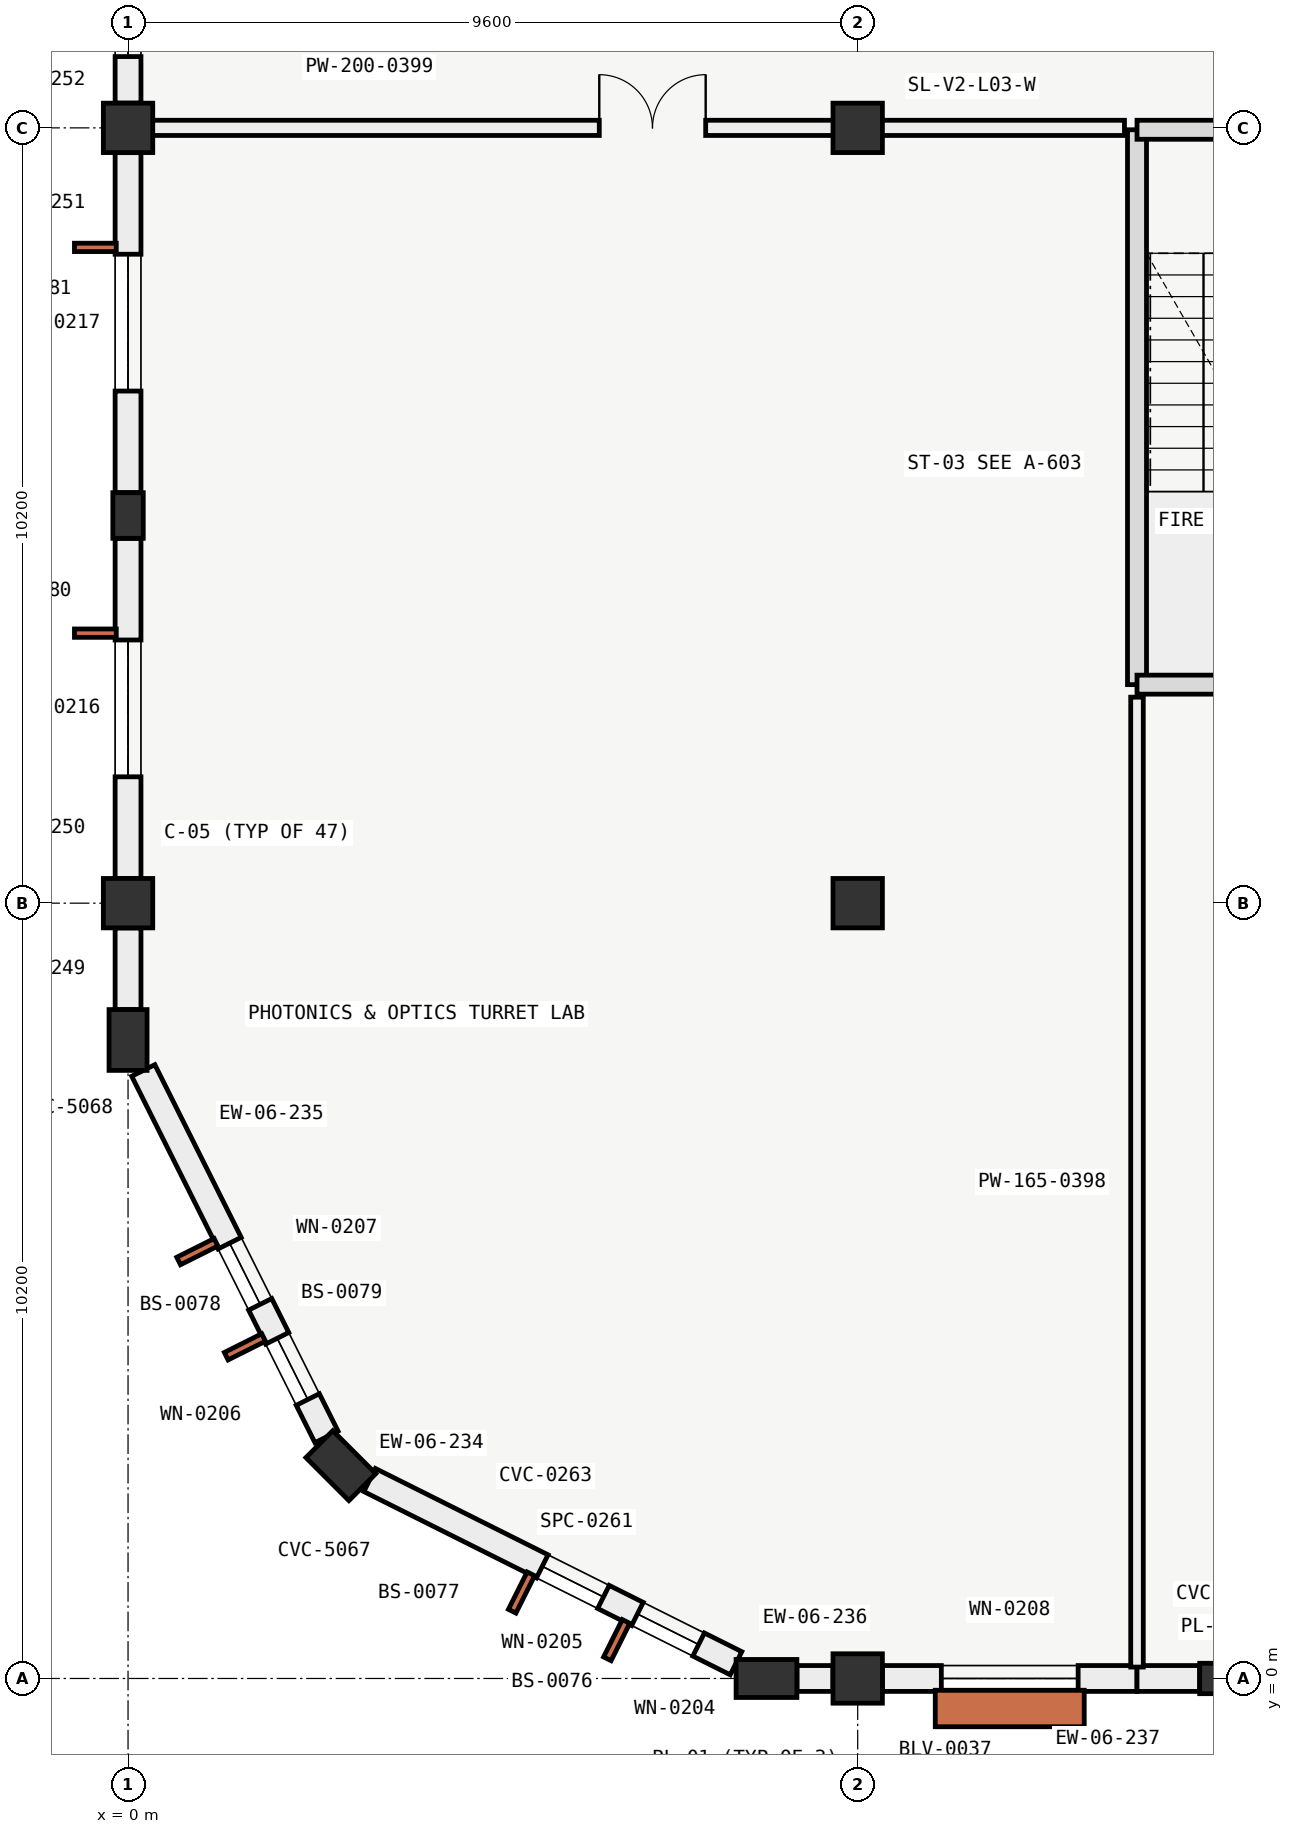
"""IFC4 building model, lengths in metres.
Left out: names, types, materials, properties, quantities, classifications, styles, units other than length and angle.
Written with IfcOpenShell. Run it as: python <this file> out.ifc"""

import sys

from ifc_helpers import new_model, si_unit, direction, frame, frame_2d, origin, origin_2d, place, context, subcontext, project, spatial, rectangle, extrude, element, fill, save


model = new_model("IFC4")
c1 = context("Model", 3, precision=1e-05, world=origin(), true_north=direction((0.0, 1.0)))
c2 = subcontext(c1, "Body", "Model", "MODEL_VIEW")
j1 = project(units=[si_unit("LENGTHUNIT", "METRE"), si_unit("PLANEANGLEUNIT", "RADIAN")], contexts=[c1])
p1 = place(None, origin())
s1 = spatial("IfcSite", under=j1, at=p1, CompositionType="ELEMENT")
p2 = place(p1, origin())
s2 = spatial("IfcBuilding", under=s1, at=p2, CompositionType="ELEMENT")
p3 = place(p2, frame((0.0, 0.0, 13.8)))
s3 = spatial("IfcBuildingStorey", under=s2, at=p3, CompositionType="ELEMENT", Elevation=13.8)
for number, where, z_axis, x_axis in (
    (1, (0.0, 10.2, 0.0), (0.0, 0.0, 1.0), (1.0, 0.0, 0.0)),
    (2, (0.0, 20.4, 0.0), (0.0, 0.0, 1.0), (1.0, 0.0, 0.0)),
    (3, (9.6, 0.0, 0.0), (0.0, 0.0, 1.0), (1.0, 0.0, 0.0)),
    (4, (9.6, 10.2, 0.0), (0.0, 0.0, 1.0), (1.0, 0.0, 0.0)),
    (5, (9.6, 20.4, 0.0), (0.0, 0.0, 1.0), (1.0, 0.0, 0.0)),
):
    element("IfcColumn", number, at=place(p3, frame(where, z_axis=z_axis, x_axis=x_axis)), inside=s3, PredefinedType="COLUMN", context=c2, shape_type="SweptSolid", body=[
        extrude(rectangle(XDim=0.65, YDim=0.65, at=origin_2d()), origin(), (0.0, 0.0, 1.0), 4.2),
    ])
for number, where, z_axis, x_axis in (
    (6, (8.4, 0.0, 0.0), (0.0, 0.0, 1.0), (0.0, 1.0, 0.0)),
    (7, (2.8, 2.8, 0.0), (0.0, 0.0, 1.0), (0.707, 0.707, 0.0)),
    (8, (0.0, 8.4, 0.0), (0.0, 0.0, 1.0), (1.0, 0.0, 0.0)),
):
    element("IfcColumn", number, at=place(p3, frame(where, z_axis=z_axis, x_axis=x_axis)), inside=s3, PredefinedType="PILASTER", context=c2, shape_type="SweptSolid", body=[
        extrude(rectangle(XDim=0.5, YDim=0.8, at=origin_2d()), origin(), (0.0, 0.0, 1.0), 4.2),
    ])
for number, where, z_axis, x_axis in (
    (9, (14.4, 0.0, 0.0), (0.0, 0.0, 1.0), (0.0, 1.0, 0.0)),
    (10, (0.0, 15.3, 0.0), (0.0, 0.0, 1.0), (1.0, 0.0, 0.0)),
):
    element("IfcColumn", number, at=place(p3, frame(where, z_axis=z_axis, x_axis=x_axis)), inside=s3, PredefinedType="PILASTER", context=c2, shape_type="SweptSolid", body=[
        extrude(rectangle(XDim=0.4, YDim=0.6, at=origin_2d()), origin(), (0.0, 0.0, 1.0), 4.2),
    ])
p4 = place(p3, frame((7.999, 0.2, 0.0), z_axis=(0.0, 0.0, 1.0), x_axis=(-0.894418132042, 0.447231712958, 0.0)))
e11 = element("IfcWall", 11, at=p4, inside=s3, PredefinedType="SOLIDWALL", context=c2, shape_type="SweptSolid", body=[
    extrude(rectangle(XDim=5.39, YDim=0.34, at=frame_2d((2.695, 0.0))), origin(), (0.0, 0.0, 1.0), 3.23),
])
p5 = place(p4, frame((0.55, 0.0, 0.7)))
e12 = element("IfcOpeningElement", 12, at=p5, cuts=e11, PredefinedType="OPENING", context=c2, shape_type="SweptSolid", body=[
    extrude(rectangle(XDim=0.9, YDim=2.2, at=frame_2d((0.45, 1.1))), frame((0.0, 0.18, 0.0), z_axis=(0.0, -1.0, 0.0), x_axis=(1.0, 0.0, 0.0)), (0.0, 0.0, 1.0), 0.36),
])
p6 = place(p4, frame((1.95, 0.0, 0.7)))
e13 = element("IfcOpeningElement", 13, at=p6, cuts=e11, PredefinedType="OPENING", context=c2, shape_type="SweptSolid", body=[
    extrude(rectangle(XDim=0.9, YDim=2.2, at=frame_2d((0.45, 1.1))), frame((0.0, 0.18, 0.0), z_axis=(0.0, -1.0, 0.0), x_axis=(1.0, 0.0, 0.0)), (0.0, 0.0, 1.0), 0.36),
])
p7 = place(p3, frame((2.611, 3.178, 0.0), z_axis=(0.0, 0.0, 1.0), x_axis=(-0.447231712958, 0.894418132042, 0.0)))
e14 = element("IfcWall", 14, at=p7, inside=s3, PredefinedType="SOLIDWALL", context=c2, shape_type="SweptSolid", body=[
    extrude(rectangle(XDim=5.39, YDim=0.34, at=frame_2d((2.695, 0.0))), origin(), (0.0, 0.0, 1.0), 3.23),
])
p8 = place(p7, frame((0.55, 0.0, 0.7)))
e15 = element("IfcOpeningElement", 15, at=p8, cuts=e14, PredefinedType="OPENING", context=c2, shape_type="SweptSolid", body=[
    extrude(rectangle(XDim=0.9, YDim=2.2, at=frame_2d((0.45, 1.1))), frame((0.0, 0.18, 0.0), z_axis=(0.0, -1.0, 0.0), x_axis=(1.0, 0.0, 0.0)), (0.0, 0.0, 1.0), 0.36),
])
p9 = place(p7, frame((1.95, 0.0, 0.7)))
e16 = element("IfcOpeningElement", 16, at=p9, cuts=e14, PredefinedType="OPENING", context=c2, shape_type="SweptSolid", body=[
    extrude(rectangle(XDim=0.9, YDim=2.2, at=frame_2d((0.45, 1.1))), frame((0.0, 0.18, 0.0), z_axis=(0.0, -1.0, 0.0), x_axis=(1.0, 0.0, 0.0)), (0.0, 0.0, 1.0), 0.36),
])
p10 = place(p3, frame((9.274, 0.0, 0.0), z_axis=(0.0, 0.0, 1.0), x_axis=(-1.0, 0.0, 0.0)))
e17 = element("IfcWall", 17, at=p10, inside=s3, PredefinedType="SOLIDWALL", context=c2, shape_type="SweptSolid", body=[
    extrude(rectangle(XDim=0.473, YDim=0.34, at=frame_2d((0.236, 0.0))), origin(), (0.0, 0.0, 1.0), 3.28),
])
p11 = place(p3, frame((13.275, 0.0, 0.0), z_axis=(0.0, 0.0, 1.0), x_axis=(-1.0, 0.0, 0.0)))
e18 = element("IfcWall", 18, at=p11, inside=s3, PredefinedType="SOLIDWALL", context=c2, shape_type="SweptSolid", body=[
    extrude(rectangle(XDim=3.349, YDim=0.34, at=frame_2d((1.674, 0.0))), origin(), (0.0, 0.0, 1.0), 3.28),
])
p12 = place(p11, frame((0.774, 0.0, 0.8)))
e19 = element("IfcOpeningElement", 19, at=p12, cuts=e18, PredefinedType="OPENING", context=c2, shape_type="SweptSolid", body=[
    extrude(rectangle(XDim=1.8, YDim=2.1, at=frame_2d((0.9, 1.05))), frame((0.0, 0.18, 0.0), z_axis=(0.0, -1.0, 0.0), x_axis=(1.0, 0.0, 0.0)), (0.0, 0.0, 1.0), 0.36),
])
p13 = place(p3, frame((14.099, 0.0, 0.0), z_axis=(0.0, 0.0, 1.0), x_axis=(-1.0, 0.0, 0.0)))
e20 = element("IfcWall", 20, at=p13, inside=s3, PredefinedType="SOLIDWALL", context=c2, shape_type="SweptSolid", body=[
    extrude(rectangle(XDim=0.824, YDim=0.34, at=frame_2d((0.412, 0.0))), origin(), (0.0, 0.0, 1.0), 3.28),
])
p14 = place(p3, frame((0.0, 8.801, 0.0), z_axis=(0.0, 0.0, 1.0), x_axis=(0.0, 1.0, 0.0)))
e21 = element("IfcWall", 21, at=p14, inside=s3, PredefinedType="SOLIDWALL", context=c2, shape_type="SweptSolid", body=[
    extrude(rectangle(XDim=1.073, YDim=0.34, at=frame_2d((0.537, 0.0))), origin(), (0.0, 0.0, 1.0), 3.28),
])
p15 = place(p3, frame((0.0, 10.526, 0.0), z_axis=(0.0, 0.0, 1.0), x_axis=(0.0, 1.0, 0.0)))
e22 = element("IfcWall", 22, at=p15, inside=s3, PredefinedType="SOLIDWALL", context=c2, shape_type="SweptSolid", body=[
    extrude(rectangle(XDim=4.473, YDim=0.34, at=frame_2d((2.237, 0.0))), origin(), (0.0, 0.0, 1.0), 3.28),
])
p16 = place(p15, frame((1.336, 0.0, 0.85)))
e23 = element("IfcOpeningElement", 23, at=p16, cuts=e22, PredefinedType="OPENING", context=c2, shape_type="SweptSolid", body=[
    extrude(rectangle(XDim=1.8, YDim=2.1, at=frame_2d((0.9, 1.05))), frame((0.0, 0.18, 0.0), z_axis=(0.0, -1.0, 0.0), x_axis=(1.0, 0.0, 0.0)), (0.0, 0.0, 1.0), 0.36),
])
p17 = place(p3, frame((0.0, 15.601, 0.0), z_axis=(0.0, 0.0, 1.0), x_axis=(0.0, 1.0, 0.0)))
e24 = element("IfcWall", 24, at=p17, inside=s3, PredefinedType="SOLIDWALL", context=c2, shape_type="SweptSolid", body=[
    extrude(rectangle(XDim=4.473, YDim=0.34, at=frame_2d((2.236, 0.0))), origin(), (0.0, 0.0, 1.0), 3.28),
])
p18 = place(p17, frame((1.336, 0.0, 0.85)))
e25 = element("IfcOpeningElement", 25, at=p18, cuts=e24, PredefinedType="OPENING", context=c2, shape_type="SweptSolid", body=[
    extrude(rectangle(XDim=1.8, YDim=2.1, at=frame_2d((0.9, 1.05))), frame((0.0, 0.18, 0.0), z_axis=(0.0, -1.0, 0.0), x_axis=(1.0, 0.0, 0.0)), (0.0, 0.0, 1.0), 0.36),
])
p19 = place(p3, frame((0.0, 20.726, 0.0), z_axis=(0.0, 0.0, 1.0), x_axis=(0.0, 1.0, 0.0)))
e26 = element("IfcWall", 26, at=p19, inside=s3, PredefinedType="SOLIDWALL", context=c2, shape_type="SweptSolid", body=[
    extrude(rectangle(XDim=3.224, YDim=0.34, at=frame_2d((1.612, 0.0))), origin(), (0.0, 0.0, 1.0), 3.28),
])
p20 = place(p19, frame((0.612, 0.0, 0.75)))
e27 = element("IfcOpeningElement", 27, at=p20, cuts=e26, PredefinedType="OPENING", context=c2, shape_type="SweptSolid", body=[
    extrude(rectangle(XDim=2.0, YDim=1.35, at=frame_2d((1.0, 0.675))), frame((0.0, 0.18, 0.0), z_axis=(0.0, -1.0, 0.0), x_axis=(1.0, 0.0, 0.0)), (0.0, 0.0, 1.0), 0.36),
])
p21 = place(p3, frame((13.275, 20.375, 0.0), z_axis=(0.0, 0.0, 1.0), x_axis=(0.0, -1.0, 0.0)))
e28 = element("IfcWall", 28, at=p21, inside=s3, PredefinedType="SOLIDWALL", context=c2, shape_type="SweptSolid", body=[
    extrude(rectangle(XDim=7.3, YDim=0.25, at=frame_2d((3.65, 0.0))), origin(), (0.0, 0.0, 1.0), 3.95),
])
p22 = place(p3, frame((13.275, 13.075, 0.0), z_axis=(0.0, 0.0, 1.0), x_axis=(1.0, 0.0, 0.0)))
e29 = element("IfcWall", 29, at=p22, inside=s3, PredefinedType="SOLIDWALL", context=c2, shape_type="SweptSolid", body=[
    extrude(rectangle(XDim=3.45, YDim=0.25, at=frame_2d((1.725, 0.0))), origin(), (0.0, 0.0, 1.0), 3.95),
])
p23 = place(p3, frame((16.725, 20.375, 0.0), z_axis=(0.0, 0.0, 1.0), x_axis=(-1.0, 0.0, 0.0)))
e30 = element("IfcWall", 30, at=p23, inside=s3, PredefinedType="SOLIDWALL", context=c2, shape_type="SweptSolid", body=[
    extrude(rectangle(XDim=3.45, YDim=0.25, at=frame_2d((1.725, 0.0))), origin(), (0.0, 0.0, 1.0), 3.95),
])
p24 = place(p23, frame((1.175, 0.0, 0.0)))
e31 = element("IfcOpeningElement", 31, at=p24, cuts=e30, PredefinedType="OPENING", context=c2, shape_type="SweptSolid", body=[
    extrude(rectangle(XDim=1.1, YDim=2.2, at=frame_2d((0.55, 1.1))), frame((0.0, 0.135, 0.0), z_axis=(0.0, -1.0, 0.0), x_axis=(1.0, 0.0, 0.0)), (0.0, 0.0, 1.0), 0.27),
])
p25 = place(p3, frame((13.275, 0.15, 0.0), z_axis=(0.0, 0.0, 1.0), x_axis=(0.0, 1.0, 0.0)))
e32 = element("IfcWall", 32, at=p25, inside=s3, PredefinedType="PARTITIONING", context=c2, shape_type="SweptSolid", body=[
    extrude(rectangle(XDim=12.76, YDim=0.165, at=frame_2d((6.38, 0.0))), origin(), (0.0, 0.0, 1.0), 3.33),
])
p26 = place(p3, frame((0.15, 20.4, 0.0), z_axis=(0.0, 0.0, 1.0), x_axis=(1.0, 0.0, 0.0)))
e33 = element("IfcWall", 33, at=p26, inside=s3, PredefinedType="PARTITIONING", context=c2, shape_type="SweptSolid", body=[
    extrude(rectangle(XDim=12.96, YDim=0.2, at=frame_2d((6.48, 0.0))), origin(), (0.0, 0.0, 1.0), 3.28),
])
p27 = place(p26, frame((6.05, 0.0, 0.0)))
e34 = element("IfcOpeningElement", 34, at=p27, cuts=e33, PredefinedType="OPENING", context=c2, shape_type="SweptSolid", body=[
    extrude(rectangle(XDim=1.4, YDim=2.2, at=frame_2d((0.7, 1.1))), frame((0.0, 0.11, 0.0), z_axis=(0.0, -1.0, 0.0), x_axis=(1.0, 0.0, 0.0)), (0.0, 0.0, 1.0), 0.22),
])
p28 = place(p5, origin())
e35 = element("IfcWindow", 35, at=p28, inside=s3, PartitioningType="SINGLE_PANEL", PredefinedType="WINDOW", context=c2, shape_type="SweptSolid", body=[
    extrude(rectangle(XDim=0.9, YDim=2.2, at=frame_2d((0.45, 1.1))), frame((0.0, 0.03, 0.0), z_axis=(0.0, -1.0, 0.0), x_axis=(1.0, 0.0, 0.0)), (0.0, 0.0, 1.0), 0.06),
])
fill(e12, e35)
p29 = place(p6, origin())
e36 = element("IfcWindow", 36, at=p29, inside=s3, PartitioningType="SINGLE_PANEL", PredefinedType="WINDOW", context=c2, shape_type="SweptSolid", body=[
    extrude(rectangle(XDim=0.9, YDim=2.2, at=frame_2d((0.45, 1.1))), frame((0.0, 0.03, 0.0), z_axis=(0.0, -1.0, 0.0), x_axis=(1.0, 0.0, 0.0)), (0.0, 0.0, 1.0), 0.06),
])
fill(e13, e36)
p30 = place(p8, origin())
e37 = element("IfcWindow", 37, at=p30, inside=s3, PartitioningType="SINGLE_PANEL", PredefinedType="WINDOW", context=c2, shape_type="SweptSolid", body=[
    extrude(rectangle(XDim=0.9, YDim=2.2, at=frame_2d((0.45, 1.1))), frame((0.0, 0.03, 0.0), z_axis=(0.0, -1.0, 0.0), x_axis=(1.0, 0.0, 0.0)), (0.0, 0.0, 1.0), 0.06),
])
fill(e15, e37)
p31 = place(p9, origin())
e38 = element("IfcWindow", 38, at=p31, inside=s3, PartitioningType="SINGLE_PANEL", PredefinedType="WINDOW", context=c2, shape_type="SweptSolid", body=[
    extrude(rectangle(XDim=0.9, YDim=2.2, at=frame_2d((0.45, 1.1))), frame((0.0, 0.03, 0.0), z_axis=(0.0, -1.0, 0.0), x_axis=(1.0, 0.0, 0.0)), (0.0, 0.0, 1.0), 0.06),
])
fill(e16, e38)
p32 = place(p12, origin())
e39 = element("IfcWindow", 39, at=p32, inside=s3, PartitioningType="SINGLE_PANEL", PredefinedType="WINDOW", context=c2, shape_type="SweptSolid", body=[
    extrude(rectangle(XDim=1.8, YDim=2.1, at=frame_2d((0.9, 1.05))), frame((0.0, 0.03, 0.0), z_axis=(0.0, -1.0, 0.0), x_axis=(1.0, 0.0, 0.0)), (0.0, 0.0, 1.0), 0.06),
])
fill(e19, e39)
p33 = place(p16, origin())
e40 = element("IfcWindow", 40, at=p33, inside=s3, PartitioningType="SINGLE_PANEL", PredefinedType="WINDOW", context=c2, shape_type="SweptSolid", body=[
    extrude(rectangle(XDim=1.8, YDim=2.1, at=frame_2d((0.9, 1.05))), frame((0.0, 0.03, 0.0), z_axis=(0.0, -1.0, 0.0), x_axis=(1.0, 0.0, 0.0)), (0.0, 0.0, 1.0), 0.06),
])
fill(e23, e40)
p34 = place(p18, origin())
e41 = element("IfcWindow", 41, at=p34, inside=s3, PartitioningType="SINGLE_PANEL", PredefinedType="WINDOW", context=c2, shape_type="SweptSolid", body=[
    extrude(rectangle(XDim=1.8, YDim=2.1, at=frame_2d((0.9, 1.05))), frame((0.0, 0.03, 0.0), z_axis=(0.0, -1.0, 0.0), x_axis=(1.0, 0.0, 0.0)), (0.0, 0.0, 1.0), 0.06),
])
fill(e25, e41)
p35 = place(p20, origin())
e42 = element("IfcWindow", 42, at=p35, inside=s3, PartitioningType="SINGLE_PANEL", PredefinedType="WINDOW", context=c2, shape_type="SweptSolid", body=[
    extrude(rectangle(XDim=2.0, YDim=1.35, at=frame_2d((1.0, 0.675))), frame((0.0, 0.03, 0.0), z_axis=(0.0, -1.0, 0.0), x_axis=(1.0, 0.0, 0.0)), (0.0, 0.0, 1.0), 0.06),
])
fill(e27, e42)
p36 = place(p27, origin())
e43 = element("IfcDoor", 43, at=p36, inside=s3, OperationType="DOUBLE_DOOR_SINGLE_SWING", PredefinedType="DOOR", context=c2, shape_type="SweptSolid", body=[
    extrude(rectangle(XDim=1.4, YDim=2.2, at=frame_2d((0.7, 1.1))), frame((0.0, 0.025, 0.0), z_axis=(0.0, -1.0, 0.0), x_axis=(1.0, 0.0, 0.0)), (0.0, 0.0, 1.0), 0.05),
])
fill(e34, e43)
save(model, sys.argv[1])
